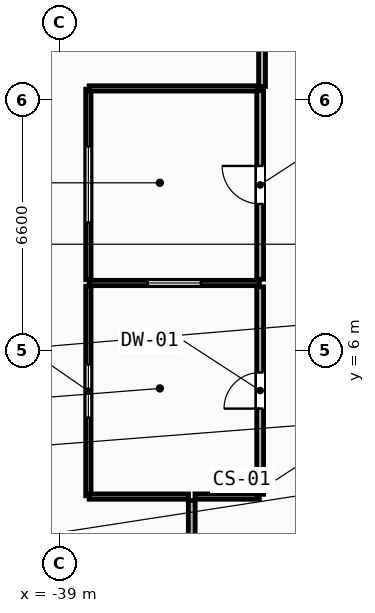
"""IFC4 building model, lengths in metres.
Left out: names, types, materials, properties, quantities, classifications, styles, units other than length and angle.
Written with IfcOpenShell. Run it as: python <this file> out.ifc"""

import sys

from ifc_helpers import new_model, si_unit, direction, frame, frame_2d, origin, place, context, subcontext, project, spatial, rectangle, extrude, element, fill, save


model = new_model("IFC4")
c1 = context("Model", 3, precision=1e-05, world=origin(), true_north=direction((0.0, 1.0)))
c2 = subcontext(c1, "Body", "Model", "MODEL_VIEW")
j1 = project(units=[si_unit("LENGTHUNIT", "METRE"), si_unit("PLANEANGLEUNIT", "RADIAN")], contexts=[c1])
p1 = place(None, origin())
s1 = spatial("IfcSite", under=j1, at=p1, CompositionType="ELEMENT")
p2 = place(p1, origin())
s2 = spatial("IfcBuilding", under=s1, at=p2, CompositionType="ELEMENT")
p3 = place(p2, frame((0.0, 0.0, 20.0)))
s3 = spatial("IfcBuildingStorey", under=s2, at=p3, CompositionType="ELEMENT", Elevation=20.0)
p4 = place(p3, frame((-38.24, 2.18, 0.0), z_axis=(0.0, 0.0, 1.0), x_axis=(0.0, 1.0, 0.0)))
e1 = element("IfcWall", 1, at=p4, inside=s3, PredefinedType="PARTITIONING", context=c2, shape_type="SweptSolid", body=[
    extrude(rectangle(XDim=5.515, YDim=0.14, at=frame_2d((2.758, 0.0))), origin(), (0.0, 0.0, 1.0), 3.7),
])
p5 = place(p4, frame((2.058, 0.0, 1.05)))
e2 = element("IfcOpeningElement", 2, at=p5, cuts=e1, PredefinedType="OPENING", context=c2, shape_type="SweptSolid", body=[
    extrude(rectangle(XDim=1.4, YDim=1.5, at=frame_2d((0.7, 0.75))), frame((0.0, 0.08, 0.0), z_axis=(0.0, -1.0, 0.0), x_axis=(1.0, 0.0, 0.0)), (0.0, 0.0, 1.0), 0.16),
])
p6 = place(p3, frame((-38.24, 7.865, 0.0), z_axis=(0.0, 0.0, 1.0), x_axis=(0.0, 1.0, 0.0)))
e3 = element("IfcWall", 3, at=p6, inside=s3, PredefinedType="PARTITIONING", context=c2, shape_type="SweptSolid", body=[
    extrude(rectangle(XDim=5.015, YDim=0.14, at=frame_2d((2.507, 0.0))), origin(), (0.0, 0.0, 1.0), 3.7),
])
p7 = place(p6, frame((1.508, 0.0, 1.05)))
e4 = element("IfcOpeningElement", 4, at=p7, cuts=e3, PredefinedType="OPENING", context=c2, shape_type="SweptSolid", body=[
    extrude(rectangle(XDim=2.0, YDim=1.5, at=frame_2d((1.0, 0.75))), frame((0.0, 0.08, 0.0), z_axis=(0.0, -1.0, 0.0), x_axis=(1.0, 0.0, 0.0)), (0.0, 0.0, 1.0), 0.16),
])
p8 = place(p3, frame((-38.22, 2.16, 0.0), z_axis=(0.0, 0.0, 1.0), x_axis=(1.0, 0.0, 0.0)))
e5 = element("IfcWall", 5, at=p8, inside=s3, PredefinedType="PARTITIONING", context=c2, shape_type="SweptSolid", body=[
    extrude(rectangle(XDim=2.615, YDim=0.14, at=frame_2d((1.308, 0.0))), origin(), (0.0, 0.0, 1.0), 3.7),
])
p9 = place(p3, frame((-35.435, 2.16, 0.0), z_axis=(0.0, 0.0, 1.0), x_axis=(1.0, 0.0, 0.0)))
e6 = element("IfcWall", 6, at=p9, inside=s3, PredefinedType="PARTITIONING", context=c2, shape_type="SweptSolid", body=[
    extrude(rectangle(XDim=1.695, YDim=0.14, at=frame_2d((0.848, 0.0))), origin(), (0.0, 0.0, 1.0), 3.7),
])
p10 = place(p3, frame((-38.22, 7.78, 0.0), z_axis=(0.0, 0.0, 1.0), x_axis=(1.0, 0.0, 0.0)))
e7 = element("IfcWall", 7, at=p10, inside=s3, PredefinedType="PARTITIONING", context=c2, shape_type="SweptSolid", body=[
    extrude(rectangle(XDim=4.48, YDim=0.14, at=frame_2d((2.24, 0.0))), origin(), (0.0, 0.0, 1.0), 3.7),
])
p11 = place(p10, frame((1.54, 0.0, 1.05)))
e8 = element("IfcOpeningElement", 8, at=p11, cuts=e7, PredefinedType="OPENING", context=c2, shape_type="SweptSolid", body=[
    extrude(rectangle(XDim=1.4, YDim=1.5, at=frame_2d((0.7, 0.75))), frame((0.0, 0.08, 0.0), z_axis=(0.0, -1.0, 0.0), x_axis=(1.0, 0.0, 0.0)), (0.0, 0.0, 1.0), 0.16),
])
p12 = place(p3, frame((-38.22, 12.9, 0.0), z_axis=(0.0, 0.0, 1.0), x_axis=(1.0, 0.0, 0.0)))
e9 = element("IfcWall", 9, at=p12, inside=s3, PredefinedType="PARTITIONING", context=c2, shape_type="SweptSolid", body=[
    extrude(rectangle(XDim=4.48, YDim=0.14, at=frame_2d((2.24, 0.0))), origin(), (0.0, 0.0, 1.0), 3.7),
])
p13 = place(p3, frame((-33.72, 2.22, 0.0), z_axis=(0.0, 0.0, 1.0), x_axis=(0.0, 1.0, 0.0)))
e10 = element("IfcWall", 10, at=p13, inside=s3, PredefinedType="PARTITIONING", context=c2, shape_type="SweptSolid", body=[
    extrude(rectangle(XDim=5.46, YDim=0.18, at=frame_2d((2.73, 0.0))), origin(), (0.0, 0.0, 1.0), 3.7),
])
p14 = place(p13, frame((2.255, 0.0, 0.0)))
e11 = element("IfcOpeningElement", 11, at=p14, cuts=e10, PredefinedType="OPENING", context=c2, shape_type="SweptSolid", body=[
    extrude(rectangle(XDim=0.95, YDim=2.1, at=frame_2d((0.475, 1.05))), frame((0.0, 0.1, 0.0), z_axis=(0.0, -1.0, 0.0), x_axis=(1.0, 0.0, 0.0)), (0.0, 0.0, 1.0), 0.2),
])
p15 = place(p3, frame((-33.72, 7.88, 0.0), z_axis=(0.0, 0.0, 1.0), x_axis=(0.0, 1.0, 0.0)))
e12 = element("IfcWall", 12, at=p15, inside=s3, PredefinedType="PARTITIONING", context=c2, shape_type="SweptSolid", body=[
    extrude(rectangle(XDim=4.96, YDim=0.18, at=frame_2d((2.48, 0.0))), origin(), (0.0, 0.0, 1.0), 3.7),
])
p16 = place(p15, frame((1.98, 0.0, 0.0)))
e13 = element("IfcOpeningElement", 13, at=p16, cuts=e12, PredefinedType="OPENING", context=c2, shape_type="SweptSolid", body=[
    extrude(rectangle(XDim=1.0, YDim=2.15, at=frame_2d((0.5, 1.075))), frame((0.0, 0.1, 0.0), z_axis=(0.0, -1.0, 0.0), x_axis=(1.0, 0.0, 0.0)), (0.0, 0.0, 1.0), 0.2),
])
p17 = place(p3, frame((-33.67, 17.428, 0.0), z_axis=(0.0, 0.0, 1.0), x_axis=(0.0, -1.0, 0.0)))
e14 = element("IfcWall", 14, at=p17, inside=s3, PredefinedType="PARTITIONING", context=c2, shape_type="SweptSolid", body=[
    extrude(rectangle(XDim=4.477, YDim=0.18, at=frame_2d((2.239, 0.0))), origin(), (0.0, 0.0, 1.0), 3.7),
])
p18 = place(p17, frame((1.539, 0.0, 1.05)))
e15 = element("IfcOpeningElement", 15, at=p18, cuts=e14, PredefinedType="OPENING", context=c2, shape_type="SweptSolid", body=[
    extrude(rectangle(XDim=1.4, YDim=1.5, at=frame_2d((0.7, 0.75))), frame((0.0, 0.1, 0.0), z_axis=(0.0, -1.0, 0.0), x_axis=(1.0, 0.0, 0.0)), (0.0, 0.0, 1.0), 0.2),
])
p19 = place(p3, frame((-35.52, 2.059, 0.0), z_axis=(0.0, 0.0, 1.0), x_axis=(0.0, -1.0, 0.0)))
e16 = element("IfcWall", 16, at=p19, inside=s3, PredefinedType="PARTITIONING", context=c2, shape_type="SweptSolid", body=[
    extrude(rectangle(XDim=4.117, YDim=0.18, at=frame_2d((2.059, 0.0))), origin(), (0.0, 0.0, 1.0), 3.7),
])
p20 = place(p14, origin())
e17 = element("IfcDoor", 17, at=p20, inside=s3, OperationType="SINGLE_SWING_LEFT", PredefinedType="DOOR", context=c2, shape_type="SweptSolid", body=[
    extrude(rectangle(XDim=0.95, YDim=2.1, at=frame_2d((0.475, 1.05))), frame((0.0, 0.025, 0.0), z_axis=(0.0, -1.0, 0.0), x_axis=(1.0, 0.0, 0.0)), (0.0, 0.0, 1.0), 0.05),
])
fill(e11, e17)
p21 = place(p16, origin())
e18 = element("IfcDoor", 18, at=p21, inside=s3, OperationType="SINGLE_SWING_RIGHT", PredefinedType="DOOR", context=c2, shape_type="SweptSolid", body=[
    extrude(rectangle(XDim=1.0, YDim=2.15, at=frame_2d((0.5, 1.075))), frame((0.0, 0.025, 0.0), z_axis=(0.0, -1.0, 0.0), x_axis=(1.0, 0.0, 0.0)), (0.0, 0.0, 1.0), 0.05),
])
fill(e13, e18)
p22 = place(p5, origin())
e19 = element("IfcWindow", 19, at=p22, inside=s3, PartitioningType="SINGLE_PANEL", PredefinedType="WINDOW", context=c2, shape_type="SweptSolid", body=[
    extrude(rectangle(XDim=1.4, YDim=1.5, at=frame_2d((0.7, 0.75))), frame((0.0, 0.03, 0.0), z_axis=(0.0, -1.0, 0.0), x_axis=(1.0, 0.0, 0.0)), (0.0, 0.0, 1.0), 0.06),
])
fill(e2, e19)
p23 = place(p7, origin())
e20 = element("IfcWindow", 20, at=p23, inside=s3, PartitioningType="SINGLE_PANEL", PredefinedType="WINDOW", context=c2, shape_type="SweptSolid", body=[
    extrude(rectangle(XDim=2.0, YDim=1.5, at=frame_2d((1.0, 0.75))), frame((0.0, 0.03, 0.0), z_axis=(0.0, -1.0, 0.0), x_axis=(1.0, 0.0, 0.0)), (0.0, 0.0, 1.0), 0.06),
])
fill(e4, e20)
p24 = place(p11, origin())
e21 = element("IfcWindow", 21, at=p24, inside=s3, PartitioningType="SINGLE_PANEL", PredefinedType="WINDOW", context=c2, shape_type="SweptSolid", body=[
    extrude(rectangle(XDim=1.4, YDim=1.5, at=frame_2d((0.7, 0.75))), frame((0.0, 0.03, 0.0), z_axis=(0.0, -1.0, 0.0), x_axis=(1.0, 0.0, 0.0)), (0.0, 0.0, 1.0), 0.06),
])
fill(e8, e21)
save(model, sys.argv[1])
